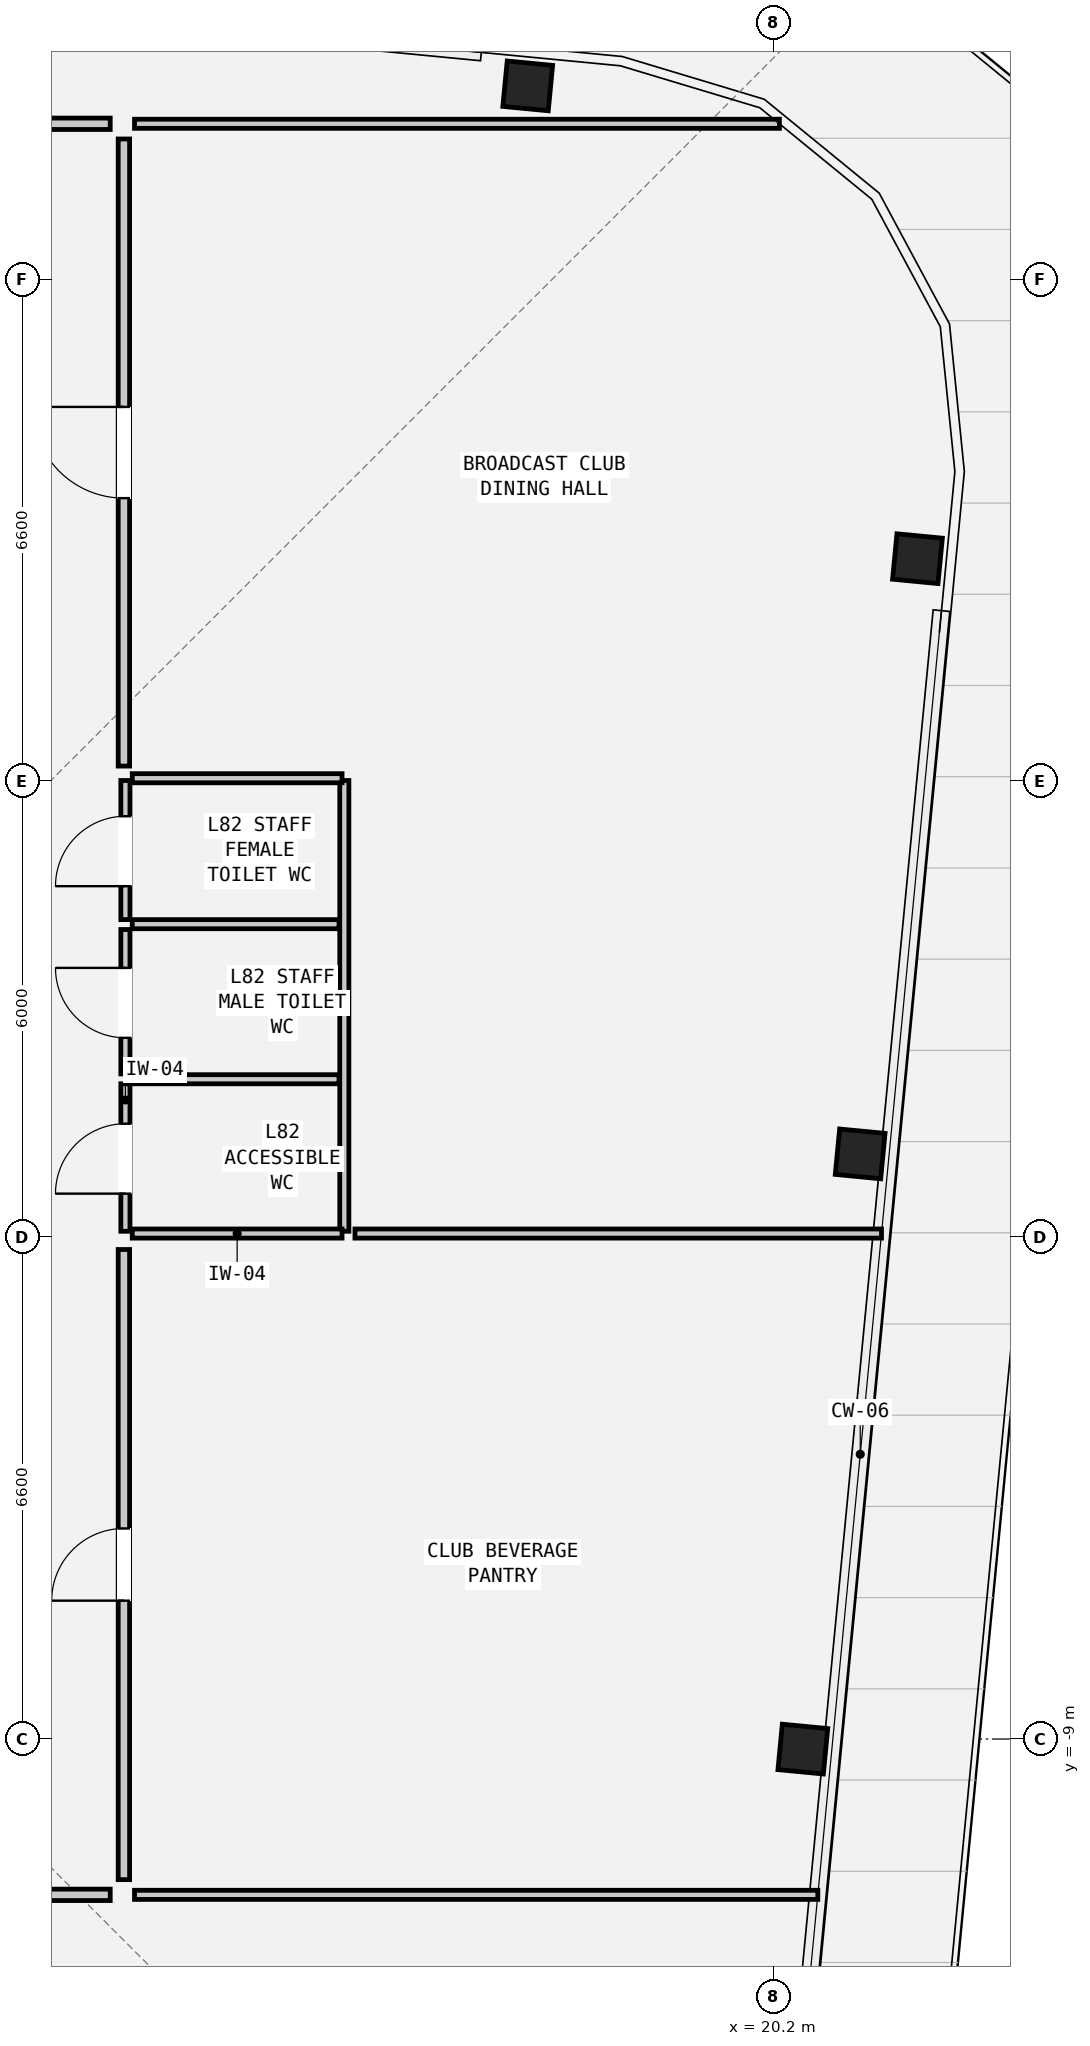
"""IFC4 building model, lengths in metres.
Left out: names, types, materials, properties, quantities, classifications, styles, units other than length and angle.
Written with IfcOpenShell. Run it as: python <this file> out.ifc"""

import sys

from ifc_helpers import new_model, si_unit, direction, frame, frame_2d, origin, origin_2d, place, context, subcontext, project, spatial, rectangle, hollow_rectangle, extrude, element, fill, save


model = new_model("IFC4")
c1 = context("Model", 3, precision=1e-05, world=origin(), true_north=direction((0.0, 1.0)))
c2 = subcontext(c1, "Body", "Model", "MODEL_VIEW")
j1 = project(units=[si_unit("LENGTHUNIT", "METRE"), si_unit("PLANEANGLEUNIT", "RADIAN")], contexts=[c1])
p1 = place(None, origin())
s1 = spatial("IfcSite", under=j1, at=p1, CompositionType="ELEMENT")
p2 = place(p1, origin())
s2 = spatial("IfcBuilding", under=s1, at=p2, CompositionType="ELEMENT")
p3 = place(p2, frame((0.0, 0.0, 276.95)))
s3 = spatial("IfcBuildingStorey", under=s2, at=p3, CompositionType="ELEMENT", Elevation=276.95)
for number, where, z_axis, x_axis in (
    (1, (20.583, -9.133, 0.0), (0.0, 0.0, 1.0), (0.096, 0.995, 0.0)),
    (2, (21.336, -1.302, 0.0), (0.0, 0.0, 1.0), (0.096, 0.995, 0.0)),
    (3, (22.09, 6.528, 0.0), (0.0, 0.0, 1.0), (0.096, 0.995, 0.0)),
    (4, (16.963, 12.749, 0.0), (0.0, 0.0, 1.0), (0.995, -0.096, 0.0)),
):
    element("IfcColumn", number, at=place(p3, frame(where, z_axis=z_axis, x_axis=x_axis)), inside=s3, PredefinedType="COLUMN", context=c2, shape_type="SweptSolid", body=[
        extrude(hollow_rectangle(XDim=0.6, YDim=0.6, WallThickness=0.04, at=origin_2d()), origin(), (0.0, 0.0, 1.0), 3.6),
    ])
p4 = place(p3, frame((11.67, -2.32, 0.0), z_axis=(0.0, 0.0, 1.0), x_axis=(0.0, 1.0, 0.0)))
e5 = element("IfcWall", 5, at=p4, inside=s3, PredefinedType="PARTITIONING", context=c2, shape_type="SweptSolid", body=[
    extrude(rectangle(XDim=1.94, YDim=0.12, at=frame_2d((0.97, 0.0))), origin(), (0.0, 0.0, 1.0), 3.41),
])
p5 = place(p4, frame((0.495, 0.0, 0.0)))
e6 = element("IfcOpeningElement", 6, at=p5, cuts=e5, PredefinedType="OPENING", context=c2, shape_type="SweptSolid", body=[
    extrude(rectangle(XDim=0.92, YDim=2.1, at=frame_2d((0.46, 1.05))), frame((0.0, 0.072, 0.0), z_axis=(0.0, -1.0, 0.0), x_axis=(1.0, 0.0, 0.0)), (0.0, 0.0, 1.0), 0.144),
])
p6 = place(p3, frame((11.67, -0.25, 0.0), z_axis=(0.0, 0.0, 1.0), x_axis=(0.0, 1.0, 0.0)))
e7 = element("IfcWall", 7, at=p6, inside=s3, PredefinedType="PARTITIONING", context=c2, shape_type="SweptSolid", body=[
    extrude(rectangle(XDim=1.9, YDim=0.12, at=frame_2d((0.95, 0.0))), origin(), (0.0, 0.0, 1.0), 3.41),
])
p7 = place(p6, frame((0.475, 0.0, 0.0)))
e8 = element("IfcOpeningElement", 8, at=p7, cuts=e7, PredefinedType="OPENING", context=c2, shape_type="SweptSolid", body=[
    extrude(rectangle(XDim=0.92, YDim=2.1, at=frame_2d((0.46, 1.05))), frame((0.0, 0.072, 0.0), z_axis=(0.0, -1.0, 0.0), x_axis=(1.0, 0.0, 0.0)), (0.0, 0.0, 1.0), 0.144),
])
p8 = place(p3, frame((11.67, 1.78, 0.0), z_axis=(0.0, 0.0, 1.0), x_axis=(0.0, 1.0, 0.0)))
e9 = element("IfcWall", 9, at=p8, inside=s3, PredefinedType="PARTITIONING", context=c2, shape_type="SweptSolid", body=[
    extrude(rectangle(XDim=1.83, YDim=0.12, at=frame_2d((0.915, 0.0))), origin(), (0.0, 0.0, 1.0), 3.41),
])
p9 = place(p8, frame((0.44, 0.0, 0.0)))
e10 = element("IfcOpeningElement", 10, at=p9, cuts=e9, PredefinedType="OPENING", context=c2, shape_type="SweptSolid", body=[
    extrude(rectangle(XDim=0.92, YDim=2.1, at=frame_2d((0.46, 1.05))), frame((0.0, 0.072, 0.0), z_axis=(0.0, -1.0, 0.0), x_axis=(1.0, 0.0, 0.0)), (0.0, 0.0, 1.0), 0.144),
])
p10 = place(p3, frame((14.55, -2.32, 0.0), z_axis=(0.0, 0.0, 1.0), x_axis=(0.0, 1.0, 0.0)))
e11 = element("IfcWall", 11, at=p10, inside=s3, PredefinedType="PARTITIONING", context=c2, shape_type="SweptSolid", body=[
    extrude(rectangle(XDim=5.93, YDim=0.12, at=frame_2d((2.965, 0.0))), origin(), (0.0, 0.0, 1.0), 3.41),
])
for number, where, z_axis, x_axis in (
    (12, (11.76, -2.35, 0.0), (0.0, 0.0, 1.0), (1.0, 0.0, 0.0)),
    (13, (11.76, 3.64, 0.0), (0.0, 0.0, 1.0), (1.0, 0.0, 0.0)),
):
    element("IfcWall", number, at=place(p3, frame(where, z_axis=z_axis, x_axis=x_axis)), inside=s3, PredefinedType="PARTITIONING", context=c2, shape_type="SweptSolid", body=[
        extrude(rectangle(XDim=2.76, YDim=0.12, at=frame_2d((1.38, 0.0))), origin(), (0.0, 0.0, 1.0), 2.61),
    ])
for number, where, z_axis, x_axis in (
    (14, (11.76, -0.32, 0.0), (0.0, 0.0, 1.0), (1.0, 0.0, 0.0)),
    (15, (11.76, 1.72, 0.0), (0.0, 0.0, 1.0), (1.0, 0.0, 0.0)),
):
    element("IfcWall", number, at=place(p3, frame(where, z_axis=z_axis, x_axis=x_axis)), inside=s3, PredefinedType="PARTITIONING", context=c2, shape_type="SweptSolid", body=[
        extrude(rectangle(XDim=2.72, YDim=0.12, at=frame_2d((1.36, 0.0))), origin(), (0.0, 0.0, 1.0), 3.41),
    ])
p11 = place(p3, frame((11.79, 12.25, 0.0), z_axis=(0.0, 0.0, 1.0), x_axis=(1.0, 0.0, 0.0)))
e16 = element("IfcWall", 16, at=p11, inside=s3, PredefinedType="PARTITIONING", context=c2, shape_type="SweptSolid", body=[
    extrude(rectangle(XDim=8.484, YDim=0.12, at=frame_2d((4.242, 0.0))), origin(), (0.0, 0.0, 1.0), 3.41),
])
p12 = place(p3, frame((11.79, -11.05, 0.0), z_axis=(0.0, 0.0, 1.0), x_axis=(1.0, 0.0, 0.0)))
e17 = element("IfcWall", 17, at=p12, inside=s3, PredefinedType="PARTITIONING", context=c2, shape_type="SweptSolid", body=[
    extrude(rectangle(XDim=8.99, YDim=0.12, at=frame_2d((4.495, 0.0))), origin(), (0.0, 0.0, 1.0), 3.41),
])
p13 = place(p3, frame((14.69, -2.35, 0.0), z_axis=(0.0, 0.0, 1.0), x_axis=(1.0, 0.0, 0.0)))
e18 = element("IfcWall", 18, at=p13, inside=s3, PredefinedType="PARTITIONING", context=c2, shape_type="SweptSolid", body=[
    extrude(rectangle(XDim=6.927, YDim=0.12, at=frame_2d((3.464, 0.0))), origin(), (0.0, 0.0, 1.0), 2.61),
])
p14 = place(p3, frame((-11.12, 12.25, 0.0), z_axis=(0.0, 0.0, 1.0), x_axis=(1.0, 0.0, 0.0)))
e19 = element("IfcWall", 19, at=p14, inside=s3, PredefinedType="PARTITIONING", context=c2, shape_type="SweptSolid", body=[
    extrude(rectangle(XDim=22.59, YDim=0.15, at=frame_2d((11.295, 0.0))), origin(), (0.0, 0.0, 1.0), 3.41),
])
p15 = place(p14, frame((10.695, 0.0, 0.0)))
e20 = element("IfcOpeningElement", 20, at=p15, cuts=e19, PredefinedType="OPENING", context=c2, shape_type="SweptSolid", body=[
    extrude(rectangle(XDim=1.2, YDim=2.1, at=frame_2d((0.6, 1.05))), frame((0.0, 0.087, 0.0), z_axis=(0.0, -1.0, 0.0), x_axis=(1.0, 0.0, 0.0)), (0.0, 0.0, 1.0), 0.174),
])
p16 = place(p3, frame((6.98, -11.05, 0.0), z_axis=(0.0, 0.0, 1.0), x_axis=(1.0, 0.0, 0.0)))
e21 = element("IfcWall", 21, at=p16, inside=s3, PredefinedType="PARTITIONING", context=c2, shape_type="SweptSolid", body=[
    extrude(rectangle(XDim=4.49, YDim=0.15, at=frame_2d((2.245, 0.0))), origin(), (0.0, 0.0, 1.0), 3.41),
])
p17 = place(p16, frame((1.645, 0.0, 0.0)))
e22 = element("IfcOpeningElement", 22, at=p17, cuts=e21, PredefinedType="OPENING", context=c2, shape_type="SweptSolid", body=[
    extrude(rectangle(XDim=1.2, YDim=2.1, at=frame_2d((0.6, 1.05))), frame((0.0, 0.087, 0.0), z_axis=(0.0, -1.0, 0.0), x_axis=(1.0, 0.0, 0.0)), (0.0, 0.0, 1.0), 0.174),
])
p18 = place(p3, frame((11.65, -10.85, 0.0), z_axis=(0.0, 0.0, 1.0), x_axis=(0.0, 1.0, 0.0)))
e23 = element("IfcWall", 23, at=p18, inside=s3, PredefinedType="PARTITIONING", context=c2, shape_type="SweptSolid", body=[
    extrude(rectangle(XDim=8.29, YDim=0.15, at=frame_2d((4.145, 0.0))), origin(), (0.0, 0.0, 1.0), 3.41),
])
p19 = place(p18, frame((3.67, 0.0, 0.0)))
e24 = element("IfcOpeningElement", 24, at=p19, cuts=e23, PredefinedType="OPENING", context=c2, shape_type="SweptSolid", body=[
    extrude(rectangle(XDim=0.95, YDim=2.1, at=frame_2d((0.475, 1.05))), frame((0.0, 0.087, 0.0), z_axis=(0.0, -1.0, 0.0), x_axis=(1.0, 0.0, 0.0)), (0.0, 0.0, 1.0), 0.174),
])
p20 = place(p3, frame((11.65, 3.8, 0.0), z_axis=(0.0, 0.0, 1.0), x_axis=(0.0, 1.0, 0.0)))
e25 = element("IfcWall", 25, at=p20, inside=s3, PredefinedType="PARTITIONING", context=c2, shape_type="SweptSolid", body=[
    extrude(rectangle(XDim=8.25, YDim=0.15, at=frame_2d((4.125, 0.0))), origin(), (0.0, 0.0, 1.0), 3.41),
])
p21 = place(p20, frame((3.525, 0.0, 0.0)))
e26 = element("IfcOpeningElement", 26, at=p21, cuts=e25, PredefinedType="OPENING", context=c2, shape_type="SweptSolid", body=[
    extrude(rectangle(XDim=1.2, YDim=2.1, at=frame_2d((0.6, 1.05))), frame((0.0, 0.087, 0.0), z_axis=(0.0, -1.0, 0.0), x_axis=(1.0, 0.0, 0.0)), (0.0, 0.0, 1.0), 0.174),
])
p22 = place(p5, origin())
e27 = element("IfcDoor", 27, at=p22, inside=s3, OperationType="SINGLE_SWING_LEFT", PredefinedType="DOOR", context=c2, shape_type="SweptSolid", body=[
    extrude(rectangle(XDim=0.92, YDim=2.1, at=frame_2d((0.46, 1.05))), frame((0.0, 0.025, 0.0), z_axis=(0.0, -1.0, 0.0), x_axis=(1.0, 0.0, 0.0)), (0.0, 0.0, 1.0), 0.05),
])
fill(e6, e27)
p23 = place(p7, origin())
e28 = element("IfcDoor", 28, at=p23, inside=s3, OperationType="SINGLE_SWING_RIGHT", PredefinedType="DOOR", context=c2, shape_type="SweptSolid", body=[
    extrude(rectangle(XDim=0.92, YDim=2.1, at=frame_2d((0.46, 1.05))), frame((0.0, 0.025, 0.0), z_axis=(0.0, -1.0, 0.0), x_axis=(1.0, 0.0, 0.0)), (0.0, 0.0, 1.0), 0.05),
])
fill(e8, e28)
p24 = place(p9, origin())
e29 = element("IfcDoor", 29, at=p24, inside=s3, OperationType="SINGLE_SWING_LEFT", PredefinedType="DOOR", context=c2, shape_type="SweptSolid", body=[
    extrude(rectangle(XDim=0.92, YDim=2.1, at=frame_2d((0.46, 1.05))), frame((0.0, 0.025, 0.0), z_axis=(0.0, -1.0, 0.0), x_axis=(1.0, 0.0, 0.0)), (0.0, 0.0, 1.0), 0.05),
])
fill(e10, e29)
p25 = place(p19, origin())
e30 = element("IfcDoor", 30, at=p25, inside=s3, OperationType="SINGLE_SWING_LEFT", PredefinedType="DOOR", context=c2, shape_type="SweptSolid", body=[
    extrude(rectangle(XDim=0.95, YDim=2.1, at=frame_2d((0.475, 1.05))), frame((0.0, 0.025, 0.0), z_axis=(0.0, -1.0, 0.0), x_axis=(1.0, 0.0, 0.0)), (0.0, 0.0, 1.0), 0.05),
])
fill(e24, e30)
p26 = place(p21, origin())
e31 = element("IfcDoor", 31, at=p26, inside=s3, OperationType="SINGLE_SWING_RIGHT", PredefinedType="DOOR", context=c2, shape_type="SweptSolid", body=[
    extrude(rectangle(XDim=1.2, YDim=2.1, at=frame_2d((0.6, 1.05))), frame((0.0, 0.025, 0.0), z_axis=(0.0, -1.0, 0.0), x_axis=(1.0, 0.0, 0.0)), (0.0, 0.0, 1.0), 0.05),
])
fill(e26, e31)
save(model, sys.argv[1])
